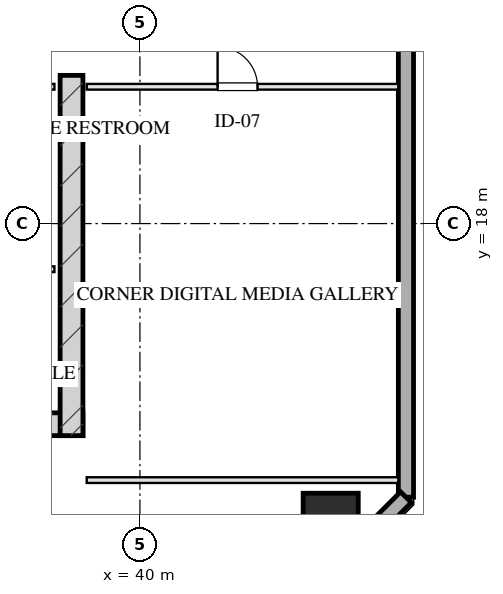
"""IFC4 building model, lengths in metres.
Left out: names, types, materials, properties, quantities, classifications, styles, units other than length and angle.
Written with IfcOpenShell. Run it as: python <this file> out.ifc"""

import sys

from ifc_helpers import new_model, si_unit, direction, frame, frame_2d, origin, origin_2d, place, context, subcontext, project, spatial, rectangle, hollow_rectangle, extrude, element, fill, save


model = new_model("IFC4")
c1 = context("Model", 3, precision=1e-05, world=origin(), true_north=direction((0.0, 1.0)))
c2 = subcontext(c1, "Body", "Model", "MODEL_VIEW")
j1 = project(units=[si_unit("LENGTHUNIT", "METRE"), si_unit("PLANEANGLEUNIT", "RADIAN")], contexts=[c1])
p1 = place(None, origin())
s1 = spatial("IfcSite", under=j1, at=p1, CompositionType="ELEMENT")
p2 = place(p1, origin())
s2 = spatial("IfcBuilding", under=s1, at=p2, CompositionType="ELEMENT")
p3 = place(p2, frame((0.0, 0.0, 173.65)))
s3 = spatial("IfcBuildingStorey", under=s2, at=p3, CompositionType="ELEMENT", Elevation=173.65)
p4 = place(p3, frame((21.5, 12.72, 0.0), z_axis=(0.0, 0.0, 1.0), x_axis=(1.0, 0.0, 0.0)))
e1 = element("IfcWall", 1, at=p4, inside=s3, PredefinedType="SHEAR", context=c2, shape_type="SweptSolid", body=[
    extrude(rectangle(XDim=17.0, YDim=0.6, at=frame_2d((8.5, 0.0))), origin(), (0.0, 0.0, 1.0), 3.45),
])
p5 = place(p3, frame((38.2, 21.9, 0.0), z_axis=(0.0, 0.0, 1.0), x_axis=(0.0, -1.0, 0.0)))
e2 = element("IfcWall", 2, at=p5, inside=s3, PredefinedType="SHEAR", context=c2, shape_type="SweptSolid", body=[
    extrude(rectangle(XDim=9.48, YDim=0.6, at=frame_2d((4.74, 0.0))), origin(), (0.0, 0.0, 1.0), 3.45),
])
p6 = place(p3, frame((45.02, 10.18, 0.0), z_axis=(0.0, 0.0, 1.0), x_axis=(1.0, 0.0, 0.0)))
e3 = element("IfcColumn", 3, at=p6, inside=s3, PredefinedType="COLUMN", context=c2, shape_type="SweptSolid", body=[
    extrude(hollow_rectangle(XDim=1.45, YDim=1.45, WallThickness=0.05, at=origin_2d()), origin(), (0.0, 0.0, 1.0), 3.451),
])
p7 = place(p3, frame((47.0, 57.2, 0.0), z_axis=(0.0, 0.0, 1.0), x_axis=(0.0, -1.0, 0.0)))
e4 = element("IfcWall", 4, at=p7, inside=s3, PredefinedType="SOLIDWALL", context=c2, shape_type="SweptSolid", body=[
    extrude(rectangle(XDim=46.4, YDim=0.4, at=frame_2d((23.2, 0.0))), origin(), (0.0, 0.0, 1.0), 2.61),
])
p8 = place(p7, frame((19.475, 0.0, 0.75)))
e5 = element("IfcOpeningElement", 5, at=p8, cuts=e4, PredefinedType="OPENING", context=c2, shape_type="SweptSolid", body=[
    extrude(rectangle(XDim=2.25, YDim=1.46, at=frame_2d((1.125, 0.73))), frame((0.0, 0.21, 0.0), z_axis=(0.0, -1.0, 0.0), x_axis=(1.0, 0.0, 0.0)), (0.0, 0.0, 1.0), 0.42),
])
p9 = place(p7, frame((15.675, 0.0, 0.75)))
e6 = element("IfcOpeningElement", 6, at=p9, cuts=e4, PredefinedType="OPENING", context=c2, shape_type="SweptSolid", body=[
    extrude(rectangle(XDim=2.25, YDim=1.46, at=frame_2d((1.125, 0.73))), frame((0.0, 0.21, 0.0), z_axis=(0.0, -1.0, 0.0), x_axis=(1.0, 0.0, 0.0)), (0.0, 0.0, 1.0), 0.42),
])
p10 = place(p7, frame((27.05, 0.0, 0.0)))
e7 = element("IfcOpeningElement", 7, at=p10, cuts=e4, PredefinedType="OPENING", context=c2, shape_type="SweptSolid", body=[
    extrude(rectangle(XDim=1.1, YDim=2.15, at=frame_2d((0.55, 1.075))), frame((0.0, 0.21, 0.0), z_axis=(0.0, -1.0, 0.0), x_axis=(1.0, 0.0, 0.0)), (0.0, 0.0, 1.0), 0.42),
])
p11 = place(p3, frame((47.0, 10.8, 0.0), z_axis=(0.0, 0.0, 1.0), x_axis=(-0.707106781187, -0.707106781187, 0.0)))
e8 = element("IfcWall", 8, at=p11, inside=s3, PredefinedType="SOLIDWALL", context=c2, shape_type="SweptSolid", body=[
    extrude(rectangle(XDim=3.677, YDim=0.4, at=frame_2d((1.838, 0.0))), origin(), (0.0, 0.0, 1.0), 2.61),
])
p12 = place(p3, frame((33.95, 21.6, 0.0), z_axis=(0.0, 0.0, 1.0), x_axis=(1.0, 0.0, 0.0)))
e9 = element("IfcWall", 9, at=p12, inside=s3, PredefinedType="PARTITIONING", context=c2, shape_type="SweptSolid", body=[
    extrude(rectangle(XDim=3.8, YDim=0.15, at=frame_2d((1.9, 0.0))), origin(), (0.0, 0.0, 1.0), 3.175),
])
p13 = place(p12, frame((0.22, 0.0, 0.0)))
e10 = element("IfcOpeningElement", 10, at=p13, cuts=e9, PredefinedType="OPENING", context=c2, shape_type="SweptSolid", body=[
    extrude(rectangle(XDim=0.95, YDim=2.05, at=frame_2d((0.475, 1.025))), frame((0.0, 0.085, 0.0), z_axis=(0.0, -1.0, 0.0), x_axis=(1.0, 0.0, 0.0)), (0.0, 0.0, 1.0), 0.17),
])
p14 = place(p3, frame((35.45, 16.8, 0.0), z_axis=(0.0, 0.0, 1.0), x_axis=(1.0, 0.0, 0.0)))
e11 = element("IfcWall", 11, at=p14, inside=s3, PredefinedType="PARTITIONING", context=c2, shape_type="SweptSolid", body=[
    extrude(rectangle(XDim=2.3, YDim=0.15, at=frame_2d((1.15, 0.0))), origin(), (0.0, 0.0, 1.0), 3.175),
])
p15 = place(p3, frame((38.6, 11.25, 0.0), z_axis=(0.0, 0.0, 1.0), x_axis=(1.0, 0.0, 0.0)))
e12 = element("IfcWall", 12, at=p15, inside=s3, PredefinedType="PARTITIONING", context=c2, shape_type="SweptSolid", body=[
    extrude(rectangle(XDim=8.2, YDim=0.15, at=frame_2d((4.1, 0.0))), origin(), (0.0, 0.0, 1.0), 3.175),
])
p16 = place(p3, frame((38.6, 21.6, 0.0), z_axis=(0.0, 0.0, 1.0), x_axis=(1.0, 0.0, 0.0)))
e13 = element("IfcWall", 13, at=p16, inside=s3, PredefinedType="PARTITIONING", context=c2, shape_type="SweptSolid", body=[
    extrude(rectangle(XDim=8.2, YDim=0.15, at=frame_2d((4.1, 0.0))), origin(), (0.0, 0.0, 1.0), 3.175),
])
p17 = place(p16, frame((3.444, 0.0, 0.0)))
e14 = element("IfcOpeningElement", 14, at=p17, cuts=e13, PredefinedType="OPENING", context=c2, shape_type="SweptSolid", body=[
    extrude(rectangle(XDim=1.05, YDim=2.05, at=frame_2d((0.525, 1.025))), frame((0.0, 0.085, 0.0), z_axis=(0.0, -1.0, 0.0), x_axis=(1.0, 0.0, 0.0)), (0.0, 0.0, 1.0), 0.17),
])
p18 = place(p17, origin())
e15 = element("IfcDoor", 15, at=p18, inside=s3, OperationType="SINGLE_SWING_LEFT", PredefinedType="DOOR", context=c2, shape_type="SweptSolid", body=[
    extrude(rectangle(XDim=1.05, YDim=2.05, at=frame_2d((0.525, 1.025))), frame((0.0, 0.025, 0.0), z_axis=(0.0, -1.0, 0.0), x_axis=(1.0, 0.0, 0.0)), (0.0, 0.0, 1.0), 0.05),
])
fill(e14, e15)
save(model, sys.argv[1])
